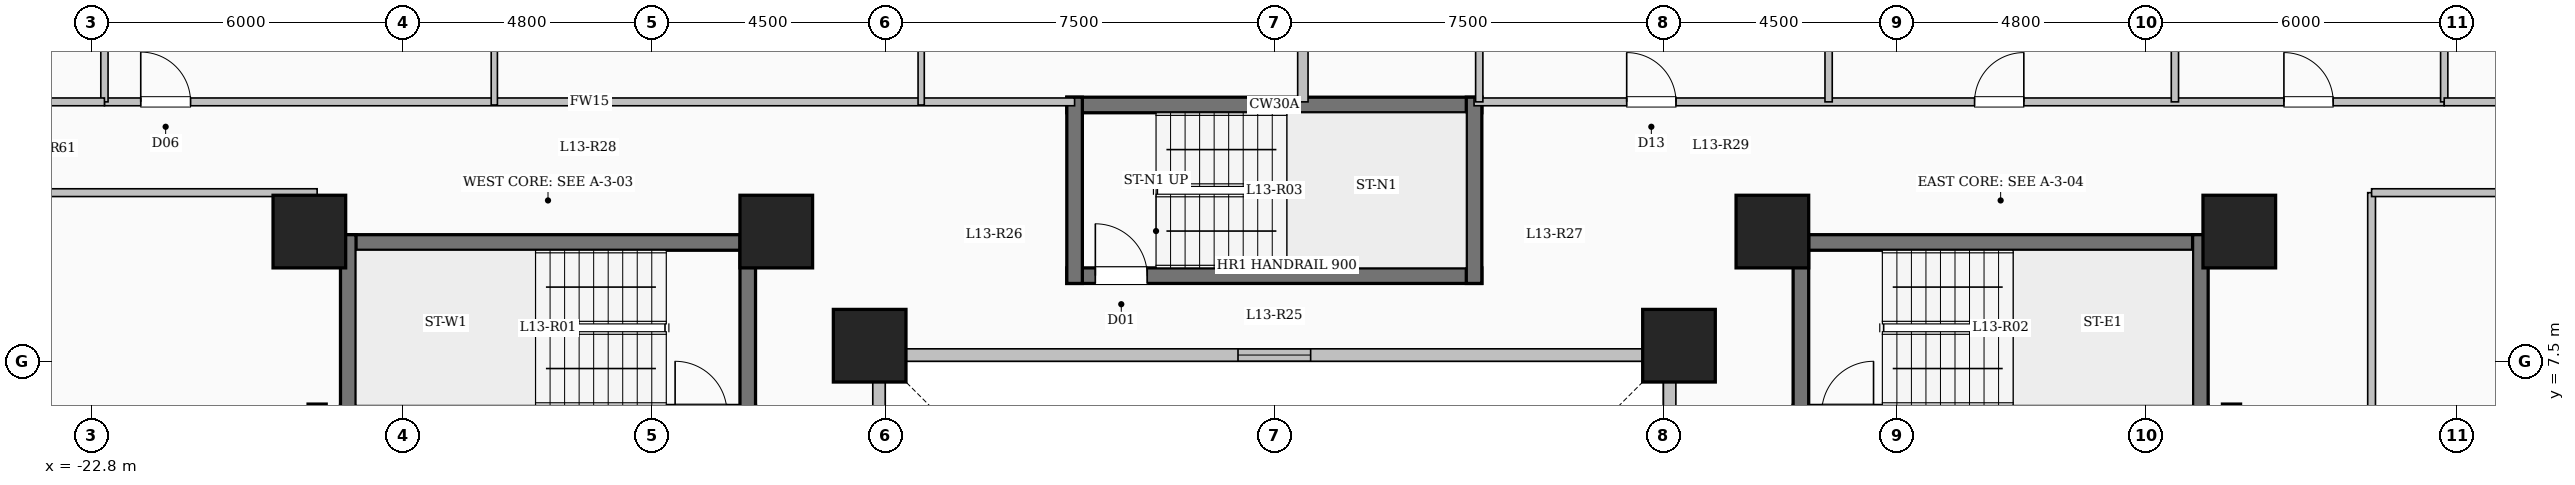
"""IFC4 building model, lengths in metres.
Left out: names, types, materials, properties, quantities, classifications, styles, units other than length and angle.
Written with IfcOpenShell. Run it as: python <this file> out.ifc"""

import sys

from ifc_helpers import new_model, si_unit, direction, frame, frame_2d, origin, origin_2d, place, context, subcontext, project, spatial, rectangle, extrude, element, fill, save


model = new_model("IFC4")
c1 = context("Model", 3, precision=1e-05, world=origin(), true_north=direction((0.0, 1.0)))
c2 = subcontext(c1, "Body", "Model", "MODEL_VIEW")
j1 = project(units=[si_unit("LENGTHUNIT", "METRE"), si_unit("PLANEANGLEUNIT", "RADIAN")], contexts=[c1])
p1 = place(None, origin())
s1 = spatial("IfcSite", under=j1, at=p1, CompositionType="ELEMENT")
p2 = place(p1, origin())
s2 = spatial("IfcBuilding", under=s1, at=p2, CompositionType="ELEMENT")
p3 = place(p2, frame((0.0, 0.0, 50.8)))
s3 = spatial("IfcBuildingStorey", under=s2, at=p3, CompositionType="ELEMENT", Elevation=50.8)
for number, where, z_axis, x_axis in (
    (1, (-7.8, 7.8, 0.0), (0.0, 0.0, 1.0), (1.0, 0.0, 0.0)),
    (2, (7.8, 7.8, 0.0), (0.0, 0.0, 1.0), (1.0, 0.0, 0.0)),
    (3, (-9.6, 10.0, 0.0), (0.0, 0.0, 1.0), (1.0, 0.0, 0.0)),
    (4, (9.6, 10.0, 0.0), (0.0, 0.0, 1.0), (1.0, 0.0, 0.0)),
    (5, (-18.6, 10.0, 0.0), (0.0, 0.0, 1.0), (1.0, 0.0, 0.0)),
    (6, (18.6, 10.0, 0.0), (0.0, 0.0, 1.0), (1.0, 0.0, 0.0)),
):
    element("IfcColumn", number, at=place(p3, frame(where, z_axis=z_axis, x_axis=x_axis)), inside=s3, PredefinedType="COLUMN", context=c2, shape_type="SweptSolid", body=[
        extrude(rectangle(XDim=1.4, YDim=1.4, at=origin_2d()), origin(), (0.0, 0.0, 1.0), 3.35),
    ])
p4 = place(p3, frame((7.62, -7.62, 0.0), z_axis=(0.0, 0.0, 1.0), x_axis=(0.0, 1.0, 0.0)))
e7 = element("IfcWall", 7, at=p4, inside=s3, PredefinedType="SOLIDWALL", context=c2, shape_type="SweptSolid", body=[
    extrude(rectangle(XDim=15.24, YDim=0.24, at=frame_2d((7.62, 0.0))), origin(), (0.0, 0.0, 1.0), 3.1),
])
p5 = place(p4, frame((6.92, 0.0, 0.95)))
e8 = element("IfcOpeningElement", 8, at=p5, cuts=e7, PredefinedType="OPENING", context=c2, shape_type="SweptSolid", body=[
    extrude(rectangle(XDim=1.4, YDim=1.5, at=frame_2d((0.7, 0.75))), frame((0.0, 0.13, 0.0), z_axis=(0.0, -1.0, 0.0), x_axis=(1.0, 0.0, 0.0)), (0.0, 0.0, 1.0), 0.26),
])
p6 = place(p3, frame((7.62, 7.62, 0.0), z_axis=(0.0, 0.0, 1.0), x_axis=(-1.0, 0.0, 0.0)))
e9 = element("IfcWall", 9, at=p6, inside=s3, PredefinedType="SOLIDWALL", context=c2, shape_type="SweptSolid", body=[
    extrude(rectangle(XDim=15.24, YDim=0.24, at=frame_2d((7.62, 0.0))), origin(), (0.0, 0.0, 1.0), 3.1),
])
p7 = place(p6, frame((6.92, 0.0, 0.95)))
e10 = element("IfcOpeningElement", 10, at=p7, cuts=e9, PredefinedType="OPENING", context=c2, shape_type="SweptSolid", body=[
    extrude(rectangle(XDim=1.4, YDim=1.5, at=frame_2d((0.7, 0.75))), frame((0.0, 0.13, 0.0), z_axis=(0.0, -1.0, 0.0), x_axis=(1.0, 0.0, 0.0)), (0.0, 0.0, 1.0), 0.26),
])
p8 = place(p3, frame((-7.62, 7.62, 0.0), z_axis=(0.0, 0.0, 1.0), x_axis=(0.0, -1.0, 0.0)))
e11 = element("IfcWall", 11, at=p8, inside=s3, PredefinedType="SOLIDWALL", context=c2, shape_type="SweptSolid", body=[
    extrude(rectangle(XDim=15.24, YDim=0.24, at=frame_2d((7.62, 0.0))), origin(), (0.0, 0.0, 1.0), 3.1),
])
p9 = place(p8, frame((6.92, 0.0, 0.95)))
e12 = element("IfcOpeningElement", 12, at=p9, cuts=e11, PredefinedType="OPENING", context=c2, shape_type="SweptSolid", body=[
    extrude(rectangle(XDim=1.4, YDim=1.5, at=frame_2d((0.7, 0.75))), frame((0.0, 0.13, 0.0), z_axis=(0.0, -1.0, 0.0), x_axis=(1.0, 0.0, 0.0)), (0.0, 0.0, 1.0), 0.26),
])
p10 = place(p3, frame((-18.0, 9.79, 0.0), z_axis=(0.0, 0.0, 1.0), x_axis=(1.0, 0.0, 0.0)))
e13 = element("IfcWall", 13, at=p10, inside=s3, PredefinedType="SHEAR", context=c2, shape_type="SweptSolid", body=[
    extrude(rectangle(XDim=8.0, YDim=0.3, at=frame_2d((4.0, 0.0))), origin(), (0.0, 0.0, 1.0), 3.35),
])
p11 = place(p3, frame((-18.0, 6.5, 0.0), z_axis=(0.0, 0.0, 1.0), x_axis=(1.0, 0.0, 0.0)))
e14 = element("IfcWall", 14, at=p11, inside=s3, PredefinedType="SHEAR", context=c2, shape_type="SweptSolid", body=[
    extrude(rectangle(XDim=8.0, YDim=0.3, at=frame_2d((4.0, 0.0))), origin(), (0.0, 0.0, 1.0), 3.35),
])
p12 = place(p11, frame((6.45, 0.0, 0.0)))
e15 = element("IfcOpeningElement", 15, at=p12, cuts=e14, PredefinedType="OPENING", context=c2, shape_type="SweptSolid", body=[
    extrude(rectangle(XDim=1.0, YDim=2.15, at=frame_2d((0.5, 1.075))), frame((0.0, 0.16, 0.0), z_axis=(0.0, -1.0, 0.0), x_axis=(1.0, 0.0, 0.0)), (0.0, 0.0, 1.0), 0.32),
])
for number, where, z_axis, x_axis in (
    (16, (-17.85, 6.35, 0.0), (0.0, 0.0, 1.0), (0.0, 1.0, 0.0)),
    (17, (-10.15, 6.35, 0.0), (0.0, 0.0, 1.0), (0.0, 1.0, 0.0)),
):
    element("IfcWall", number, at=place(p3, frame(where, z_axis=z_axis, x_axis=x_axis)), inside=s3, PredefinedType="SHEAR", context=c2, shape_type="SweptSolid", body=[
        extrude(rectangle(XDim=3.59, YDim=0.3, at=frame_2d((1.795, 0.0))), origin(), (0.0, 0.0, 1.0), 3.35),
    ])
p13 = place(p3, frame((10.0, 9.79, 0.0), z_axis=(0.0, 0.0, 1.0), x_axis=(1.0, 0.0, 0.0)))
e18 = element("IfcWall", 18, at=p13, inside=s3, PredefinedType="SHEAR", context=c2, shape_type="SweptSolid", body=[
    extrude(rectangle(XDim=8.0, YDim=0.3, at=frame_2d((4.0, 0.0))), origin(), (0.0, 0.0, 1.0), 3.35),
])
p14 = place(p3, frame((10.0, 6.5, 0.0), z_axis=(0.0, 0.0, 1.0), x_axis=(1.0, 0.0, 0.0)))
e19 = element("IfcWall", 19, at=p14, inside=s3, PredefinedType="SHEAR", context=c2, shape_type="SweptSolid", body=[
    extrude(rectangle(XDim=8.0, YDim=0.3, at=frame_2d((4.0, 0.0))), origin(), (0.0, 0.0, 1.0), 3.35),
])
p15 = place(p14, frame((0.55, 0.0, 0.0)))
e20 = element("IfcOpeningElement", 20, at=p15, cuts=e19, PredefinedType="OPENING", context=c2, shape_type="SweptSolid", body=[
    extrude(rectangle(XDim=1.0, YDim=2.15, at=frame_2d((0.5, 1.075))), frame((0.0, 0.16, 0.0), z_axis=(0.0, -1.0, 0.0), x_axis=(1.0, 0.0, 0.0)), (0.0, 0.0, 1.0), 0.32),
])
for number, where, z_axis, x_axis in (
    (21, (10.15, 6.35, 0.0), (0.0, 0.0, 1.0), (0.0, 1.0, 0.0)),
    (22, (17.85, 6.35, 0.0), (0.0, 0.0, 1.0), (0.0, 1.0, 0.0)),
):
    element("IfcWall", number, at=place(p3, frame(where, z_axis=z_axis, x_axis=x_axis)), inside=s3, PredefinedType="SHEAR", context=c2, shape_type="SweptSolid", body=[
        extrude(rectangle(XDim=3.59, YDim=0.3, at=frame_2d((1.795, 0.0))), origin(), (0.0, 0.0, 1.0), 3.35),
    ])
p16 = place(p3, frame((-4.0, 12.44, 0.0), z_axis=(0.0, 0.0, 1.0), x_axis=(1.0, 0.0, 0.0)))
e23 = element("IfcWall", 23, at=p16, inside=s3, PredefinedType="SHEAR", context=c2, shape_type="SweptSolid", body=[
    extrude(rectangle(XDim=8.0, YDim=0.3, at=frame_2d((4.0, 0.0))), origin(), (0.0, 0.0, 1.0), 3.35),
])
p17 = place(p3, frame((-4.0, 9.15, 0.0), z_axis=(0.0, 0.0, 1.0), x_axis=(1.0, 0.0, 0.0)))
e24 = element("IfcWall", 24, at=p17, inside=s3, PredefinedType="SHEAR", context=c2, shape_type="SweptSolid", body=[
    extrude(rectangle(XDim=8.0, YDim=0.3, at=frame_2d((4.0, 0.0))), origin(), (0.0, 0.0, 1.0), 3.35),
])
p18 = place(p17, frame((0.55, 0.0, 0.0)))
e25 = element("IfcOpeningElement", 25, at=p18, cuts=e24, PredefinedType="OPENING", context=c2, shape_type="SweptSolid", body=[
    extrude(rectangle(XDim=1.0, YDim=2.15, at=frame_2d((0.5, 1.075))), frame((0.0, 0.16, 0.0), z_axis=(0.0, -1.0, 0.0), x_axis=(1.0, 0.0, 0.0)), (0.0, 0.0, 1.0), 0.32),
])
for number, where, z_axis, x_axis in (
    (26, (-3.85, 9.0, 0.0), (0.0, 0.0, 1.0), (0.0, 1.0, 0.0)),
    (27, (3.85, 9.0, 0.0), (0.0, 0.0, 1.0), (0.0, 1.0, 0.0)),
):
    element("IfcWall", number, at=place(p3, frame(where, z_axis=z_axis, x_axis=x_axis)), inside=s3, PredefinedType="SHEAR", context=c2, shape_type="SweptSolid", body=[
        extrude(rectangle(XDim=3.59, YDim=0.3, at=frame_2d((1.795, 0.0))), origin(), (0.0, 0.0, 1.0), 3.35),
    ])
for number, where, z_axis, x_axis in (
    (28, (-18.45, -7.375, 0.0), (0.0, 0.0, 1.0), (0.0, 1.0, 0.0)),
    (29, (18.45, -7.375, 0.0), (0.0, 0.0, 1.0), (0.0, 1.0, 0.0)),
):
    element("IfcWall", number, at=place(p3, frame(where, z_axis=z_axis, x_axis=x_axis)), inside=s3, PredefinedType="SHEAR", context=c2, shape_type="SweptSolid", body=[
        extrude(rectangle(XDim=14.05, YDim=0.35, at=frame_2d((7.025, 0.0))), origin(), (0.0, 0.0, 1.0), 3.35),
    ])
p19 = place(p3, frame((-22.55, 12.5, 0.0), z_axis=(0.0, 0.0, 1.0), x_axis=(1.0, 0.0, 0.0)))
e30 = element("IfcWall", 30, at=p19, inside=s3, PredefinedType="PARTITIONING", context=c2, shape_type="SweptSolid", body=[
    extrude(rectangle(XDim=18.7, YDim=0.15, at=frame_2d((9.35, 0.0))), origin(), (0.0, 0.0, 1.0), 3.1),
])
p20 = place(p19, frame((0.7, 0.0, 0.0)))
e31 = element("IfcOpeningElement", 31, at=p20, cuts=e30, PredefinedType="OPENING", context=c2, shape_type="SweptSolid", body=[
    extrude(rectangle(XDim=0.96, YDim=2.15, at=frame_2d((0.48, 1.075))), frame((0.0, 0.085, 0.0), z_axis=(0.0, -1.0, 0.0), x_axis=(1.0, 0.0, 0.0)), (0.0, 0.0, 1.0), 0.17),
])
p21 = place(p3, frame((3.85, 12.5, 0.0), z_axis=(0.0, 0.0, 1.0), x_axis=(1.0, 0.0, 0.0)))
e32 = element("IfcWall", 32, at=p21, inside=s3, PredefinedType="PARTITIONING", context=c2, shape_type="SweptSolid", body=[
    extrude(rectangle(XDim=18.7, YDim=0.15, at=frame_2d((9.35, 0.0))), origin(), (0.0, 0.0, 1.0), 3.1),
])
p22 = place(p21, frame((2.942, 0.0, 0.0)))
e33 = element("IfcOpeningElement", 33, at=p22, cuts=e32, PredefinedType="OPENING", context=c2, shape_type="SweptSolid", body=[
    extrude(rectangle(XDim=0.95, YDim=2.15, at=frame_2d((0.475, 1.075))), frame((0.0, 0.085, 0.0), z_axis=(0.0, -1.0, 0.0), x_axis=(1.0, 0.0, 0.0)), (0.0, 0.0, 1.0), 0.17),
])
p23 = place(p21, frame((9.647, 0.0, 0.0)))
e34 = element("IfcOpeningElement", 34, at=p23, cuts=e32, PredefinedType="OPENING", context=c2, shape_type="SweptSolid", body=[
    extrude(rectangle(XDim=0.95, YDim=2.15, at=frame_2d((0.475, 1.075))), frame((0.0, 0.085, 0.0), z_axis=(0.0, -1.0, 0.0), x_axis=(1.0, 0.0, 0.0)), (0.0, 0.0, 1.0), 0.17),
])
p24 = place(p21, frame((15.61, 0.0, 0.0)))
e35 = element("IfcOpeningElement", 35, at=p24, cuts=e32, PredefinedType="OPENING", context=c2, shape_type="SweptSolid", body=[
    extrude(rectangle(XDim=0.95, YDim=2.15, at=frame_2d((0.475, 1.075))), frame((0.0, 0.085, 0.0), z_axis=(0.0, -1.0, 0.0), x_axis=(1.0, 0.0, 0.0)), (0.0, 0.0, 1.0), 0.17),
])
p25 = place(p3, frame((21.15, -7.25, 0.0), z_axis=(0.0, 0.0, 1.0), x_axis=(0.0, 1.0, 0.0)))
e36 = element("IfcWall", 36, at=p25, inside=s3, PredefinedType="PARTITIONING", context=c2, shape_type="SweptSolid", body=[
    extrude(rectangle(XDim=18.0, YDim=0.15, at=frame_2d((9.0, 0.0))), origin(), (0.0, 0.0, 1.0), 2.585),
])
p26 = place(p3, frame((0.55, 12.5, 0.0), z_axis=(0.0, 0.0, 1.0), x_axis=(0.0, 1.0, 0.0)))
e37 = element("IfcWall", 37, at=p26, inside=s3, PredefinedType="SOLIDWALL", context=c2, shape_type="SweptSolid", body=[
    extrude(rectangle(XDim=12.58, YDim=0.2, at=frame_2d((6.29, 0.0))), origin(), (0.0, 0.0, 1.0), 3.1),
])
p27 = place(p3, frame((-15.035, 12.44, 0.0), z_axis=(0.0, 0.0, 1.0), x_axis=(0.0, 1.0, 0.0)))
e38 = element("IfcWall", 38, at=p27, inside=s3, PredefinedType="PARTITIONING", context=c2, shape_type="SweptSolid", body=[
    extrude(rectangle(XDim=11.16, YDim=0.12, at=frame_2d((5.58, 0.0))), origin(), (0.0, 0.0, 1.0), 2.435),
])
p28 = place(p27, frame((2.905, 0.0, 0.0)))
e39 = element("IfcOpeningElement", 39, at=p28, cuts=e38, PredefinedType="OPENING", context=c2, shape_type="SweptSolid", body=[
    extrude(rectangle(XDim=1.08, YDim=2.15, at=frame_2d((0.54, 1.075))), frame((0.0, 0.07, 0.0), z_axis=(0.0, -1.0, 0.0), x_axis=(1.0, 0.0, 0.0)), (0.0, 0.0, 1.0), 0.14),
])
p29 = place(p3, frame((-6.807, 12.44, 0.0), z_axis=(0.0, 0.0, 1.0), x_axis=(0.0, 1.0, 0.0)))
e40 = element("IfcWall", 40, at=p29, inside=s3, PredefinedType="PARTITIONING", context=c2, shape_type="SweptSolid", body=[
    extrude(rectangle(XDim=2.62, YDim=0.12, at=frame_2d((1.31, 0.0))), origin(), (0.0, 0.0, 1.0), 3.1),
])
p30 = place(p3, frame((3.95, 12.5, 0.0), z_axis=(0.0, 0.0, 1.0), x_axis=(0.0, 1.0, 0.0)))
e41 = element("IfcWall", 41, at=p30, inside=s3, PredefinedType="PARTITIONING", context=c2, shape_type="SweptSolid", body=[
    extrude(rectangle(XDim=11.05, YDim=0.14, at=frame_2d((5.525, 0.0))), origin(), (0.0, 0.0, 1.0), 3.1),
])
p31 = place(p30, frame((1.2, 0.0, 0.0)))
e42 = element("IfcOpeningElement", 42, at=p31, cuts=e41, PredefinedType="OPENING", context=c2, shape_type="SweptSolid", body=[
    extrude(rectangle(XDim=0.95, YDim=2.15, at=frame_2d((0.475, 1.075))), frame((0.0, 0.08, 0.0), z_axis=(0.0, -1.0, 0.0), x_axis=(1.0, 0.0, 0.0)), (0.0, 0.0, 1.0), 0.16),
])
for number, where, z_axis, x_axis in (
    (43, (10.684, 12.5, 0.0), (0.0, 0.0, 1.0), (0.0, 1.0, 0.0)),
    (44, (17.359, 12.5, 0.0), (0.0, 0.0, 1.0), (0.0, 1.0, 0.0)),
):
    element("IfcWall", number, at=place(p3, frame(where, z_axis=z_axis, x_axis=x_axis)), inside=s3, PredefinedType="PARTITIONING", context=c2, shape_type="SweptSolid", body=[
        extrude(rectangle(XDim=11.05, YDim=0.14, at=frame_2d((5.525, 0.0))), origin(), (0.0, 0.0, 1.0), 3.1),
    ])
p32 = place(p3, frame((-28.68, 10.75, 0.0), z_axis=(0.0, 0.0, 1.0), x_axis=(1.0, 0.0, 0.0)))
e45 = element("IfcWall", 45, at=p32, inside=s3, PredefinedType="PARTITIONING", context=c2, shape_type="SweptSolid", body=[
    extrude(rectangle(XDim=10.23, YDim=0.15, at=frame_2d((5.115, 0.0))), origin(), (0.0, 0.0, 1.0), 3.1),
])
p33 = place(p3, frame((21.15, 10.75, 0.0), z_axis=(0.0, 0.0, 1.0), x_axis=(1.0, 0.0, 0.0)))
e46 = element("IfcWall", 46, at=p33, inside=s3, PredefinedType="PARTITIONING", context=c2, shape_type="SweptSolid", body=[
    extrude(rectangle(XDim=7.53, YDim=0.15, at=frame_2d((3.765, 0.0))), origin(), (0.0, 0.0, 1.0), 3.1),
])
for number, where, z_axis, x_axis in (
    (47, (-22.55, 12.5, 0.0), (0.0, 0.0, 1.0), (0.0, 1.0, 0.0)),
    (48, (22.55, 12.5, 0.0), (0.0, 0.0, 1.0), (0.0, 1.0, 0.0)),
):
    element("IfcWall", number, at=place(p3, frame(where, z_axis=z_axis, x_axis=x_axis)), inside=s3, PredefinedType="PARTITIONING", context=c2, shape_type="SweptSolid", body=[
        extrude(rectangle(XDim=6.55, YDim=0.14, at=frame_2d((3.275, 0.0))), origin(), (0.0, 0.0, 1.0), 3.1),
    ])
p34 = place(p3, frame((-28.68, 12.5, 0.0), z_axis=(0.0, 0.0, 1.0), x_axis=(1.0, 0.0, 0.0)))
e49 = element("IfcWall", 49, at=p34, inside=s3, PredefinedType="PARTITIONING", context=c2, shape_type="SweptSolid", body=[
    extrude(rectangle(XDim=6.13, YDim=0.15, at=frame_2d((3.065, 0.0))), origin(), (0.0, 0.0, 1.0), 3.1),
])
p35 = place(p34, frame((2.59, 0.0, 0.0)))
e50 = element("IfcOpeningElement", 50, at=p35, cuts=e49, PredefinedType="OPENING", context=c2, shape_type="SweptSolid", body=[
    extrude(rectangle(XDim=0.95, YDim=2.15, at=frame_2d((0.475, 1.075))), frame((0.0, 0.085, 0.0), z_axis=(0.0, -1.0, 0.0), x_axis=(1.0, 0.0, 0.0)), (0.0, 0.0, 1.0), 0.17),
])
p36 = place(p3, frame((22.55, 12.5, 0.0), z_axis=(0.0, 0.0, 1.0), x_axis=(1.0, 0.0, 0.0)))
e51 = element("IfcWall", 51, at=p36, inside=s3, PredefinedType="PARTITIONING", context=c2, shape_type="SweptSolid", body=[
    extrude(rectangle(XDim=6.13, YDim=0.15, at=frame_2d((3.065, 0.0))), origin(), (0.0, 0.0, 1.0), 3.1),
])
p37 = place(p36, frame((2.59, 0.0, 0.0)))
e52 = element("IfcOpeningElement", 52, at=p37, cuts=e51, PredefinedType="OPENING", context=c2, shape_type="SweptSolid", body=[
    extrude(rectangle(XDim=0.95, YDim=2.15, at=frame_2d((0.475, 1.075))), frame((0.0, 0.085, 0.0), z_axis=(0.0, -1.0, 0.0), x_axis=(1.0, 0.0, 0.0)), (0.0, 0.0, 1.0), 0.17),
])
p38 = place(p7, origin())
e53 = element("IfcWindow", 53, at=p38, inside=s3, PartitioningType="SINGLE_PANEL", PredefinedType="WINDOW", context=c2, shape_type="SweptSolid", body=[
    extrude(rectangle(XDim=1.4, YDim=1.5, at=frame_2d((0.7, 0.75))), frame((0.0, 0.03, 0.0), z_axis=(0.0, -1.0, 0.0), x_axis=(1.0, 0.0, 0.0)), (0.0, 0.0, 1.0), 0.06),
])
fill(e10, e53)
p39 = place(p18, origin())
e54 = element("IfcDoor", 54, at=p39, inside=s3, OperationType="SINGLE_SWING_LEFT", PredefinedType="DOOR", context=c2, shape_type="SweptSolid", body=[
    extrude(rectangle(XDim=1.0, YDim=2.15, at=frame_2d((0.5, 1.075))), frame((0.0, 0.025, 0.0), z_axis=(0.0, -1.0, 0.0), x_axis=(1.0, 0.0, 0.0)), (0.0, 0.0, 1.0), 0.05),
])
fill(e25, e54)
p40 = place(p20, origin())
e55 = element("IfcDoor", 55, at=p40, inside=s3, OperationType="SINGLE_SWING_LEFT", PredefinedType="DOOR", context=c2, shape_type="SweptSolid", body=[
    extrude(rectangle(XDim=0.96, YDim=2.15, at=frame_2d((0.48, 1.075))), frame((0.0, 0.025, 0.0), z_axis=(0.0, -1.0, 0.0), x_axis=(1.0, 0.0, 0.0)), (0.0, 0.0, 1.0), 0.05),
])
fill(e31, e55)
p41 = place(p22, origin())
e56 = element("IfcDoor", 56, at=p41, inside=s3, OperationType="SINGLE_SWING_LEFT", PredefinedType="DOOR", context=c2, shape_type="SweptSolid", body=[
    extrude(rectangle(XDim=0.95, YDim=2.15, at=frame_2d((0.475, 1.075))), frame((0.0, 0.025, 0.0), z_axis=(0.0, -1.0, 0.0), x_axis=(1.0, 0.0, 0.0)), (0.0, 0.0, 1.0), 0.05),
])
fill(e33, e56)
p42 = place(p23, origin())
e57 = element("IfcDoor", 57, at=p42, inside=s3, OperationType="SINGLE_SWING_RIGHT", PredefinedType="DOOR", context=c2, shape_type="SweptSolid", body=[
    extrude(rectangle(XDim=0.95, YDim=2.15, at=frame_2d((0.475, 1.075))), frame((0.0, 0.025, 0.0), z_axis=(0.0, -1.0, 0.0), x_axis=(1.0, 0.0, 0.0)), (0.0, 0.0, 1.0), 0.05),
])
fill(e34, e57)
p43 = place(p24, origin())
e58 = element("IfcDoor", 58, at=p43, inside=s3, OperationType="SINGLE_SWING_LEFT", PredefinedType="DOOR", context=c2, shape_type="SweptSolid", body=[
    extrude(rectangle(XDim=0.95, YDim=2.15, at=frame_2d((0.475, 1.075))), frame((0.0, 0.025, 0.0), z_axis=(0.0, -1.0, 0.0), x_axis=(1.0, 0.0, 0.0)), (0.0, 0.0, 1.0), 0.05),
])
fill(e35, e58)
save(model, sys.argv[1])
